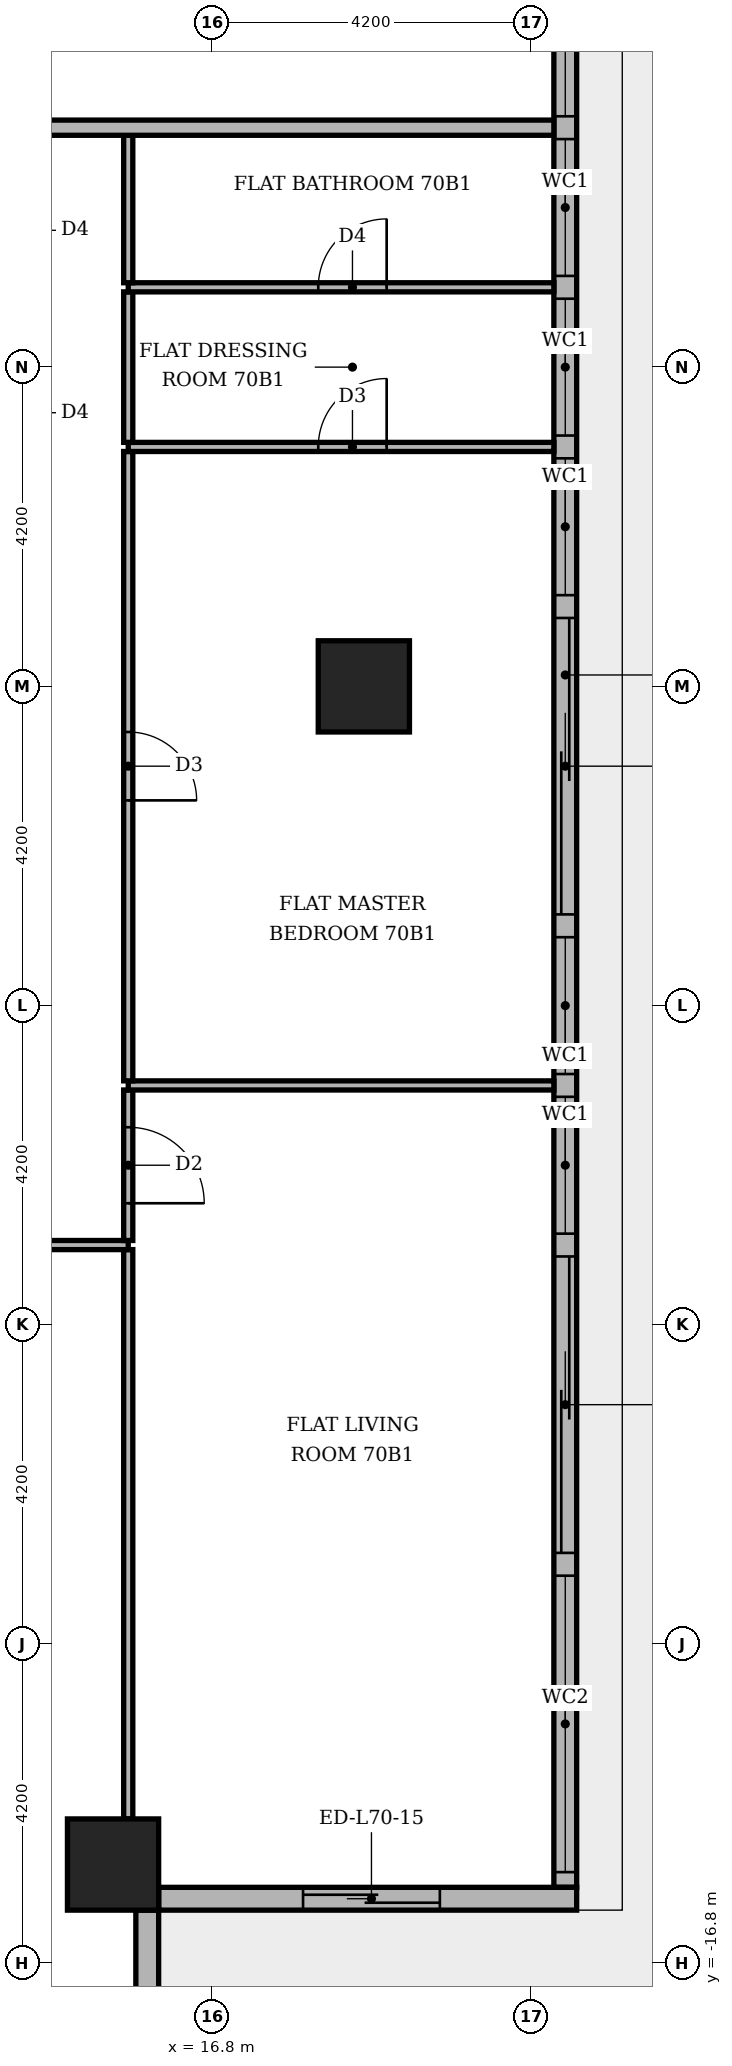
"""IFC4 building model, lengths in metres.
Left out: names, types, materials, properties, quantities, classifications, styles, units other than length and angle.
Written with IfcOpenShell. Run it as: python <this file> out.ifc"""

import sys

from ifc_helpers import new_model, si_unit, direction, frame, frame_2d, origin, origin_2d, place, context, subcontext, project, spatial, rectangle, extrude, element, fill, save


model = new_model("IFC4")
c1 = context("Model", 3, precision=1e-05, world=origin(), true_north=direction((0.0, 1.0)))
c2 = subcontext(c1, "Body", "Model", "MODEL_VIEW")
j1 = project(units=[si_unit("LENGTHUNIT", "METRE"), si_unit("PLANEANGLEUNIT", "RADIAN")], contexts=[c1])
p1 = place(None, origin())
s1 = spatial("IfcSite", under=j1, at=p1, CompositionType="ELEMENT")
p2 = place(p1, origin())
s2 = spatial("IfcBuilding", under=s1, at=p2, CompositionType="ELEMENT")
p3 = place(p2, frame((0.0, 0.0, 292.8)))
s3 = spatial("IfcBuildingStorey", under=s2, at=p3, CompositionType="ELEMENT", Elevation=292.8)
for number, where, z_axis, x_axis in (
    (1, (18.8, 0.0, -0.35), (0.0, 0.0, 1.0), (1.0, 0.0, 0.0)),
    (2, (15.5, -15.5, -0.35), (0.0, 0.0, 1.0), (1.0, 0.0, 0.0)),
):
    element("IfcColumn", number, at=place(p3, frame(where, z_axis=z_axis, x_axis=x_axis)), inside=s3, PredefinedType="COLUMN", context=c2, shape_type="SweptSolid", body=[
        extrude(rectangle(XDim=1.2, YDim=1.2, at=origin_2d()), origin(), (0.0, 0.0, 1.0), 4.25),
    ])
p4 = place(p3, frame((21.45, -15.8, 0.0), z_axis=(0.0, 0.0, 1.0), x_axis=(0.0, 1.0, 0.0)))
e3 = element("IfcWall", 3, at=p4, inside=s3, PredefinedType="STANDARD", context=c2, shape_type="SweptSolid", body=[
    extrude(rectangle(XDim=31.9, YDim=0.3, at=frame_2d((15.95, 0.0))), origin(), (0.0, 0.0, 1.0), 3.55),
])
p5 = place(p4, frame((0.2, 0.0, 0.6)))
e4 = element("IfcOpeningElement", 4, at=p5, cuts=e3, PredefinedType="OPENING", context=c2, shape_type="SweptSolid", body=[
    extrude(rectangle(XDim=3.9, YDim=2.4, at=frame_2d((1.95, 1.2))), frame((0.0, 0.16, 0.0), z_axis=(0.0, -1.0, 0.0), x_axis=(1.0, 0.0, 0.0)), (0.0, 0.0, 1.0), 0.32),
])
p6 = place(p4, frame((4.4, 0.0, 0.0)))
e5 = element("IfcOpeningElement", 5, at=p6, cuts=e3, PredefinedType="OPENING", context=c2, shape_type="SweptSolid", body=[
    extrude(rectangle(XDim=3.9, YDim=2.4, at=frame_2d((1.95, 1.2))), frame((0.0, 0.16, 0.0), z_axis=(0.0, -1.0, 0.0), x_axis=(1.0, 0.0, 0.0)), (0.0, 0.0, 1.0), 0.32),
])
p7 = place(p4, frame((8.6, 0.0, 0.6)))
e6 = element("IfcOpeningElement", 6, at=p7, cuts=e3, PredefinedType="OPENING", context=c2, shape_type="SweptSolid", body=[
    extrude(rectangle(XDim=1.8, YDim=2.4, at=frame_2d((0.9, 1.2))), frame((0.0, 0.16, 0.0), z_axis=(0.0, -1.0, 0.0), x_axis=(1.0, 0.0, 0.0)), (0.0, 0.0, 1.0), 0.32),
])
p8 = place(p4, frame((10.7, 0.0, 0.6)))
e7 = element("IfcOpeningElement", 7, at=p8, cuts=e3, PredefinedType="OPENING", context=c2, shape_type="SweptSolid", body=[
    extrude(rectangle(XDim=1.8, YDim=2.4, at=frame_2d((0.9, 1.2))), frame((0.0, 0.16, 0.0), z_axis=(0.0, -1.0, 0.0), x_axis=(1.0, 0.0, 0.0)), (0.0, 0.0, 1.0), 0.32),
])
p9 = place(p4, frame((12.8, 0.0, 0.0)))
e8 = element("IfcOpeningElement", 8, at=p9, cuts=e3, PredefinedType="OPENING", context=c2, shape_type="SweptSolid", body=[
    extrude(rectangle(XDim=3.9, YDim=2.4, at=frame_2d((1.95, 1.2))), frame((0.0, 0.16, 0.0), z_axis=(0.0, -1.0, 0.0), x_axis=(1.0, 0.0, 0.0)), (0.0, 0.0, 1.0), 0.32),
])
p10 = place(p4, frame((17.0, 0.0, 0.6)))
e9 = element("IfcOpeningElement", 9, at=p10, cuts=e3, PredefinedType="OPENING", context=c2, shape_type="SweptSolid", body=[
    extrude(rectangle(XDim=1.8, YDim=2.4, at=frame_2d((0.9, 1.2))), frame((0.0, 0.16, 0.0), z_axis=(0.0, -1.0, 0.0), x_axis=(1.0, 0.0, 0.0)), (0.0, 0.0, 1.0), 0.32),
])
p11 = place(p4, frame((19.1, 0.0, 0.6)))
e10 = element("IfcOpeningElement", 10, at=p11, cuts=e3, PredefinedType="OPENING", context=c2, shape_type="SweptSolid", body=[
    extrude(rectangle(XDim=1.8, YDim=2.4, at=frame_2d((0.9, 1.2))), frame((0.0, 0.16, 0.0), z_axis=(0.0, -1.0, 0.0), x_axis=(1.0, 0.0, 0.0)), (0.0, 0.0, 1.0), 0.32),
])
p12 = place(p4, frame((21.2, 0.0, 0.6)))
e11 = element("IfcOpeningElement", 11, at=p12, cuts=e3, PredefinedType="OPENING", context=c2, shape_type="SweptSolid", body=[
    extrude(rectangle(XDim=1.8, YDim=2.4, at=frame_2d((0.9, 1.2))), frame((0.0, 0.16, 0.0), z_axis=(0.0, -1.0, 0.0), x_axis=(1.0, 0.0, 0.0)), (0.0, 0.0, 1.0), 0.32),
])
p13 = place(p4, frame((23.3, 0.0, 0.6)))
e12 = element("IfcOpeningElement", 12, at=p13, cuts=e3, PredefinedType="OPENING", context=c2, shape_type="SweptSolid", body=[
    extrude(rectangle(XDim=6.0, YDim=2.4, at=frame_2d((3.0, 1.2))), frame((0.0, 0.16, 0.0), z_axis=(0.0, -1.0, 0.0), x_axis=(1.0, 0.0, 0.0)), (0.0, 0.0, 1.0), 0.32),
])
p14 = place(p4, frame((29.6, 0.0, 0.6)))
e13 = element("IfcOpeningElement", 13, at=p14, cuts=e3, PredefinedType="OPENING", context=c2, shape_type="SweptSolid", body=[
    extrude(rectangle(XDim=1.8, YDim=2.4, at=frame_2d((0.9, 1.2))), frame((0.0, 0.16, 0.0), z_axis=(0.0, -1.0, 0.0), x_axis=(1.0, 0.0, 0.0)), (0.0, 0.0, 1.0), 0.32),
])
p15 = place(p3, frame((15.95, -21.3, 0.0), z_axis=(0.0, 0.0, 1.0), x_axis=(0.0, 1.0, 0.0)))
e14 = element("IfcWall", 14, at=p15, inside=s3, PredefinedType="STANDARD", context=c2, shape_type="SweptSolid", body=[
    extrude(rectangle(XDim=5.2, YDim=0.3, at=frame_2d((2.6, 0.0))), origin(), (0.0, 0.0, 1.0), 3.55),
])
p16 = place(p15, frame((1.5, 0.0, 0.0)))
e15 = element("IfcOpeningElement", 15, at=p16, cuts=e14, PredefinedType="OPENING", context=c2, shape_type="SweptSolid", body=[
    extrude(rectangle(XDim=1.8, YDim=2.4, at=frame_2d((0.9, 1.2))), frame((0.0, 0.16, 0.0), z_axis=(0.0, -1.0, 0.0), x_axis=(1.0, 0.0, 0.0)), (0.0, 0.0, 1.0), 0.32),
])
p17 = place(p3, frame((16.1, -15.95, 0.0), z_axis=(0.0, 0.0, 1.0), x_axis=(1.0, 0.0, 0.0)))
e16 = element("IfcWall", 16, at=p17, inside=s3, PredefinedType="STANDARD", context=c2, shape_type="SweptSolid", body=[
    extrude(rectangle(XDim=5.5, YDim=0.3, at=frame_2d((2.75, 0.0))), origin(), (0.0, 0.0, 1.0), 3.55),
])
p18 = place(p17, frame((1.9, 0.0, 0.0)))
e17 = element("IfcOpeningElement", 17, at=p18, cuts=e16, PredefinedType="OPENING", context=c2, shape_type="SweptSolid", body=[
    extrude(rectangle(XDim=1.8, YDim=2.4, at=frame_2d((0.9, 1.2))), frame((0.0, 0.16, 0.0), z_axis=(0.0, -1.0, 0.0), x_axis=(1.0, 0.0, 0.0)), (0.0, 0.0, 1.0), 0.32),
])
p19 = place(p3, frame((15.7, -14.9, 0.0), z_axis=(0.0, 0.0, 1.0), x_axis=(0.0, 1.0, 0.0)))
e18 = element("IfcWall", 18, at=p19, inside=s3, PredefinedType="PARTITIONING", context=c2, shape_type="SweptSolid", body=[
    extrude(rectangle(XDim=7.49, YDim=0.12, at=frame_2d((3.745, 0.0))), origin(), (0.0, 0.0, 1.0), 3.55),
])
p20 = place(p3, frame((7.35, -7.35, 0.0), z_axis=(0.0, 0.0, 1.0), x_axis=(1.0, 0.0, 0.0)))
e19 = element("IfcWall", 19, at=p20, inside=s3, PredefinedType="PARTITIONING", context=c2, shape_type="SweptSolid", body=[
    extrude(rectangle(XDim=8.35, YDim=0.12, at=frame_2d((4.175, 0.0))), origin(), (0.0, 0.0, 1.0), 3.55),
])
p21 = place(p20, frame((3.725, 0.0, 0.0)))
e20 = element("IfcOpeningElement", 20, at=p21, cuts=e19, PredefinedType="OPENING", context=c2, shape_type="SweptSolid", body=[
    extrude(rectangle(XDim=0.9, YDim=2.1, at=frame_2d((0.45, 1.05))), frame((0.0, 0.07, 0.0), z_axis=(0.0, -1.0, 0.0), x_axis=(1.0, 0.0, 0.0)), (0.0, 0.0, 1.0), 0.14),
])
p22 = place(p3, frame((15.7, -7.29, 0.0), z_axis=(0.0, 0.0, 1.0), x_axis=(0.0, 1.0, 0.0)))
e21 = element("IfcWall", 21, at=p22, inside=s3, PredefinedType="PARTITIONING", context=c2, shape_type="SweptSolid", body=[
    extrude(rectangle(XDim=1.98, YDim=0.12, at=frame_2d((0.99, 0.0))), origin(), (0.0, 0.0, 1.0), 3.55),
])
p23 = place(p22, frame((0.49, 0.0, 0.0)))
e22 = element("IfcOpeningElement", 22, at=p23, cuts=e21, PredefinedType="OPENING", context=c2, shape_type="SweptSolid", body=[
    extrude(rectangle(XDim=1.0, YDim=2.1, at=frame_2d((0.5, 1.05))), frame((0.0, 0.07, 0.0), z_axis=(0.0, -1.0, 0.0), x_axis=(1.0, 0.0, 0.0)), (0.0, 0.0, 1.0), 0.14),
])
p24 = place(p3, frame((15.7, -5.25, 0.0), z_axis=(0.0, 0.0, 1.0), x_axis=(1.0, 0.0, 0.0)))
e23 = element("IfcWall", 23, at=p24, inside=s3, PredefinedType="PARTITIONING", context=c2, shape_type="SweptSolid", body=[
    extrude(rectangle(XDim=5.6, YDim=0.12, at=frame_2d((2.8, 0.0))), origin(), (0.0, 0.0, 1.0), 3.55),
])
p25 = place(p3, frame((15.7, -5.19, 0.0), z_axis=(0.0, 0.0, 1.0), x_axis=(0.0, 1.0, 0.0)))
e24 = element("IfcWall", 24, at=p25, inside=s3, PredefinedType="PARTITIONING", context=c2, shape_type="SweptSolid", body=[
    extrude(rectangle(XDim=8.28, YDim=0.12, at=frame_2d((4.14, 0.0))), origin(), (0.0, 0.0, 1.0), 3.55),
])
p26 = place(p25, frame((3.69, 0.0, 0.0)))
e25 = element("IfcOpeningElement", 25, at=p26, cuts=e24, PredefinedType="OPENING", context=c2, shape_type="SweptSolid", body=[
    extrude(rectangle(XDim=0.9, YDim=2.1, at=frame_2d((0.45, 1.05))), frame((0.0, 0.07, 0.0), z_axis=(0.0, -1.0, 0.0), x_axis=(1.0, 0.0, 0.0)), (0.0, 0.0, 1.0), 0.14),
])
p27 = place(p3, frame((15.7, 3.15, 0.0), z_axis=(0.0, 0.0, 1.0), x_axis=(1.0, 0.0, 0.0)))
e26 = element("IfcWall", 26, at=p27, inside=s3, PredefinedType="PARTITIONING", context=c2, shape_type="SweptSolid", body=[
    extrude(rectangle(XDim=5.6, YDim=0.12, at=frame_2d((2.8, 0.0))), origin(), (0.0, 0.0, 1.0), 3.55),
])
p28 = place(p27, frame((2.5, 0.0, 0.0)))
e27 = element("IfcOpeningElement", 27, at=p28, cuts=e26, PredefinedType="OPENING", context=c2, shape_type="SweptSolid", body=[
    extrude(rectangle(XDim=0.9, YDim=2.1, at=frame_2d((0.45, 1.05))), frame((0.0, 0.07, 0.0), z_axis=(0.0, -1.0, 0.0), x_axis=(1.0, 0.0, 0.0)), (0.0, 0.0, 1.0), 0.14),
])
p29 = place(p3, frame((15.7, 3.21, 0.0), z_axis=(0.0, 0.0, 1.0), x_axis=(0.0, 1.0, 0.0)))
e28 = element("IfcWall", 28, at=p29, inside=s3, PredefinedType="PARTITIONING", context=c2, shape_type="SweptSolid", body=[
    extrude(rectangle(XDim=1.98, YDim=0.12, at=frame_2d((0.99, 0.0))), origin(), (0.0, 0.0, 1.0), 3.55),
])
p30 = place(p3, frame((15.7, 5.25, 0.0), z_axis=(0.0, 0.0, 1.0), x_axis=(1.0, 0.0, 0.0)))
e29 = element("IfcWall", 29, at=p30, inside=s3, PredefinedType="PARTITIONING", context=c2, shape_type="SweptSolid", body=[
    extrude(rectangle(XDim=5.6, YDim=0.12, at=frame_2d((2.8, 0.0))), origin(), (0.0, 0.0, 1.0), 3.55),
])
p31 = place(p30, frame((2.5, 0.0, 0.0)))
e30 = element("IfcOpeningElement", 30, at=p31, cuts=e29, PredefinedType="OPENING", context=c2, shape_type="SweptSolid", body=[
    extrude(rectangle(XDim=0.9, YDim=2.1, at=frame_2d((0.45, 1.05))), frame((0.0, 0.07, 0.0), z_axis=(0.0, -1.0, 0.0), x_axis=(1.0, 0.0, 0.0)), (0.0, 0.0, 1.0), 0.14),
])
p32 = place(p3, frame((15.7, 5.31, 0.0), z_axis=(0.0, 0.0, 1.0), x_axis=(0.0, 1.0, 0.0)))
e31 = element("IfcWall", 31, at=p32, inside=s3, PredefinedType="PARTITIONING", context=c2, shape_type="SweptSolid", body=[
    extrude(rectangle(XDim=1.94, YDim=0.12, at=frame_2d((0.97, 0.0))), origin(), (0.0, 0.0, 1.0), 3.55),
])
p33 = place(p3, frame((1.3, 7.35, 0.0), z_axis=(0.0, 0.0, 1.0), x_axis=(1.0, 0.0, 0.0)))
e32 = element("IfcWall", 32, at=p33, inside=s3, PredefinedType="PARTITIONING", context=c2, shape_type="SweptSolid", body=[
    extrude(rectangle(XDim=20.0, YDim=0.2, at=frame_2d((10.0, 0.0))), origin(), (0.0, 0.0, 1.0), 3.55),
])
p34 = place(p33, frame((3.4, 0.0, 0.0)))
e33 = element("IfcOpeningElement", 33, at=p34, cuts=e32, PredefinedType="OPENING", context=c2, shape_type="SweptSolid", body=[
    extrude(rectangle(XDim=1.1, YDim=2.4, at=frame_2d((0.55, 1.2))), frame((0.0, 0.11, 0.0), z_axis=(0.0, -1.0, 0.0), x_axis=(1.0, 0.0, 0.0)), (0.0, 0.0, 1.0), 0.22),
])
p35 = place(p5, origin())
e34 = element("IfcWindow", 34, at=p35, inside=s3, PartitioningType="SINGLE_PANEL", PredefinedType="WINDOW", context=c2, shape_type="SweptSolid", body=[
    extrude(rectangle(XDim=3.9, YDim=2.4, at=frame_2d((1.95, 1.2))), frame((0.0, 0.03, 0.0), z_axis=(0.0, -1.0, 0.0), x_axis=(1.0, 0.0, 0.0)), (0.0, 0.0, 1.0), 0.06),
])
fill(e4, e34)
p36 = place(p6, origin())
e35 = element("IfcDoor", 35, at=p36, inside=s3, OperationType="SLIDING_TO_RIGHT", PredefinedType="DOOR", context=c2, shape_type="SweptSolid", body=[
    extrude(rectangle(XDim=3.9, YDim=2.4, at=frame_2d((1.95, 1.2))), frame((0.0, 0.025, 0.0), z_axis=(0.0, -1.0, 0.0), x_axis=(1.0, 0.0, 0.0)), (0.0, 0.0, 1.0), 0.05),
])
fill(e5, e35)
p37 = place(p7, origin())
e36 = element("IfcWindow", 36, at=p37, inside=s3, PartitioningType="SINGLE_PANEL", PredefinedType="WINDOW", context=c2, shape_type="SweptSolid", body=[
    extrude(rectangle(XDim=1.8, YDim=2.4, at=frame_2d((0.9, 1.2))), frame((0.0, 0.03, 0.0), z_axis=(0.0, -1.0, 0.0), x_axis=(1.0, 0.0, 0.0)), (0.0, 0.0, 1.0), 0.06),
])
fill(e6, e36)
p38 = place(p8, origin())
e37 = element("IfcWindow", 37, at=p38, inside=s3, PartitioningType="SINGLE_PANEL", PredefinedType="WINDOW", context=c2, shape_type="SweptSolid", body=[
    extrude(rectangle(XDim=1.8, YDim=2.4, at=frame_2d((0.9, 1.2))), frame((0.0, 0.03, 0.0), z_axis=(0.0, -1.0, 0.0), x_axis=(1.0, 0.0, 0.0)), (0.0, 0.0, 1.0), 0.06),
])
fill(e7, e37)
p39 = place(p9, origin())
e38 = element("IfcDoor", 38, at=p39, inside=s3, OperationType="SLIDING_TO_RIGHT", PredefinedType="DOOR", context=c2, shape_type="SweptSolid", body=[
    extrude(rectangle(XDim=3.9, YDim=2.4, at=frame_2d((1.95, 1.2))), frame((0.0, 0.025, 0.0), z_axis=(0.0, -1.0, 0.0), x_axis=(1.0, 0.0, 0.0)), (0.0, 0.0, 1.0), 0.05),
])
fill(e8, e38)
p40 = place(p10, origin())
e39 = element("IfcWindow", 39, at=p40, inside=s3, PartitioningType="SINGLE_PANEL", PredefinedType="WINDOW", context=c2, shape_type="SweptSolid", body=[
    extrude(rectangle(XDim=1.8, YDim=2.4, at=frame_2d((0.9, 1.2))), frame((0.0, 0.03, 0.0), z_axis=(0.0, -1.0, 0.0), x_axis=(1.0, 0.0, 0.0)), (0.0, 0.0, 1.0), 0.06),
])
fill(e9, e39)
p41 = place(p11, origin())
e40 = element("IfcWindow", 40, at=p41, inside=s3, PartitioningType="SINGLE_PANEL", PredefinedType="WINDOW", context=c2, shape_type="SweptSolid", body=[
    extrude(rectangle(XDim=1.8, YDim=2.4, at=frame_2d((0.9, 1.2))), frame((0.0, 0.03, 0.0), z_axis=(0.0, -1.0, 0.0), x_axis=(1.0, 0.0, 0.0)), (0.0, 0.0, 1.0), 0.06),
])
fill(e10, e40)
p42 = place(p12, origin())
e41 = element("IfcWindow", 41, at=p42, inside=s3, PartitioningType="SINGLE_PANEL", PredefinedType="WINDOW", context=c2, shape_type="SweptSolid", body=[
    extrude(rectangle(XDim=1.8, YDim=2.4, at=frame_2d((0.9, 1.2))), frame((0.0, 0.03, 0.0), z_axis=(0.0, -1.0, 0.0), x_axis=(1.0, 0.0, 0.0)), (0.0, 0.0, 1.0), 0.06),
])
fill(e11, e41)
p43 = place(p13, origin())
e42 = element("IfcWindow", 42, at=p43, inside=s3, PartitioningType="SINGLE_PANEL", PredefinedType="WINDOW", context=c2, shape_type="SweptSolid", body=[
    extrude(rectangle(XDim=6.0, YDim=2.4, at=frame_2d((3.0, 1.2))), frame((0.0, 0.03, 0.0), z_axis=(0.0, -1.0, 0.0), x_axis=(1.0, 0.0, 0.0)), (0.0, 0.0, 1.0), 0.06),
])
fill(e12, e42)
p44 = place(p18, origin())
e43 = element("IfcDoor", 43, at=p44, inside=s3, OperationType="SLIDING_TO_LEFT", PredefinedType="DOOR", context=c2, shape_type="SweptSolid", body=[
    extrude(rectangle(XDim=1.8, YDim=2.4, at=frame_2d((0.9, 1.2))), frame((0.0, 0.025, 0.0), z_axis=(0.0, -1.0, 0.0), x_axis=(1.0, 0.0, 0.0)), (0.0, 0.0, 1.0), 0.05),
])
fill(e17, e43)
p45 = place(p23, frame((1.0, 0.0, 0.0), z_axis=(0.0, 0.0, 1.0), x_axis=(-1.0, 0.0, 0.0)))
e44 = element("IfcDoor", 44, at=p45, inside=s3, OperationType="SINGLE_SWING_LEFT", PredefinedType="DOOR", context=c2, shape_type="SweptSolid", body=[
    extrude(rectangle(XDim=1.0, YDim=2.1, at=frame_2d((0.5, 1.05))), frame((0.0, 0.025, 0.0), z_axis=(0.0, -1.0, 0.0), x_axis=(1.0, 0.0, 0.0)), (0.0, 0.0, 1.0), 0.05),
])
fill(e22, e44)
p46 = place(p26, frame((0.9, 0.0, 0.0), z_axis=(0.0, 0.0, 1.0), x_axis=(-1.0, 0.0, 0.0)))
e45 = element("IfcDoor", 45, at=p46, inside=s3, OperationType="SINGLE_SWING_LEFT", PredefinedType="DOOR", context=c2, shape_type="SweptSolid", body=[
    extrude(rectangle(XDim=0.9, YDim=2.1, at=frame_2d((0.45, 1.05))), frame((0.0, 0.025, 0.0), z_axis=(0.0, -1.0, 0.0), x_axis=(1.0, 0.0, 0.0)), (0.0, 0.0, 1.0), 0.05),
])
fill(e25, e45)
p47 = place(p28, origin())
e46 = element("IfcDoor", 46, at=p47, inside=s3, OperationType="SINGLE_SWING_RIGHT", PredefinedType="DOOR", context=c2, shape_type="SweptSolid", body=[
    extrude(rectangle(XDim=0.9, YDim=2.1, at=frame_2d((0.45, 1.05))), frame((0.0, 0.025, 0.0), z_axis=(0.0, -1.0, 0.0), x_axis=(1.0, 0.0, 0.0)), (0.0, 0.0, 1.0), 0.05),
])
fill(e27, e46)
p48 = place(p31, origin())
e47 = element("IfcDoor", 47, at=p48, inside=s3, OperationType="SINGLE_SWING_RIGHT", PredefinedType="DOOR", context=c2, shape_type="SweptSolid", body=[
    extrude(rectangle(XDim=0.9, YDim=2.1, at=frame_2d((0.45, 1.05))), frame((0.0, 0.025, 0.0), z_axis=(0.0, -1.0, 0.0), x_axis=(1.0, 0.0, 0.0)), (0.0, 0.0, 1.0), 0.05),
])
fill(e30, e47)
save(model, sys.argv[1])
